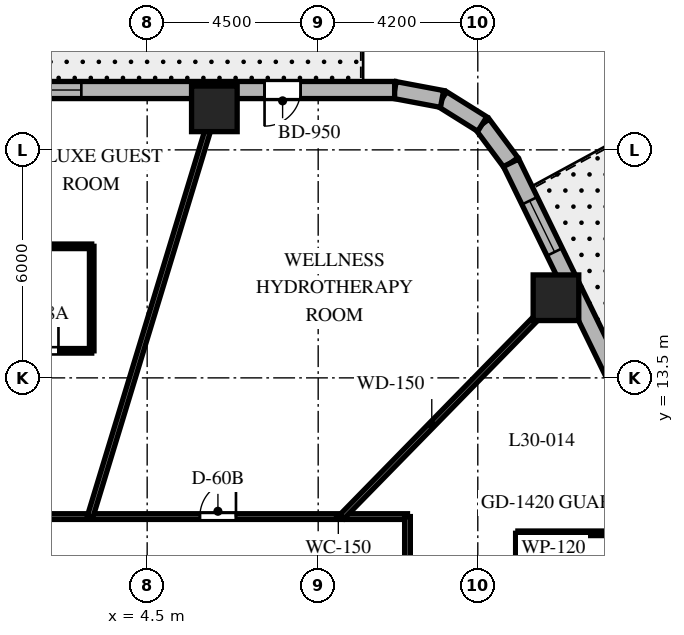
"""IFC4 building model, lengths in metres.
Left out: names, types, materials, properties, quantities, classifications, styles, units other than length and angle.
Written with IfcOpenShell. Run it as: python <this file> out.ifc"""

import sys

from ifc_helpers import new_model, si_unit, direction, frame, frame_2d, origin, origin_2d, place, context, subcontext, project, spatial, rectangle, extrude, element, fill, save


model = new_model("IFC4")
c1 = context("Model", 3, precision=1e-05, world=origin(), true_north=direction((0.0, 1.0)))
c2 = subcontext(c1, "Body", "Model", "MODEL_VIEW")
j1 = project(units=[si_unit("LENGTHUNIT", "METRE"), si_unit("PLANEANGLEUNIT", "RADIAN")], contexts=[c1])
p1 = place(None, origin())
s1 = spatial("IfcSite", under=j1, at=p1, CompositionType="ELEMENT")
p2 = place(p1, origin())
s2 = spatial("IfcBuilding", under=s1, at=p2, CompositionType="ELEMENT")
p3 = place(p2, frame((0.0, 0.0, 124.7)))
s3 = spatial("IfcBuildingStorey", under=s2, at=p3, CompositionType="ELEMENT", Elevation=124.7)
for number, where, z_axis, x_axis in (
    (1, (15.257, 15.609, 0.0), (0.0, 0.0, 1.0), (1.0, 0.0, 0.0)),
    (2, (6.268, 20.58, 0.0), (0.0, 0.0, 1.0), (1.0, 0.0, 0.0)),
):
    element("IfcColumn", number, at=place(p3, frame(where, z_axis=z_axis, x_axis=x_axis)), inside=s3, PredefinedType="COLUMN", context=c2, shape_type="SweptSolid", body=[
        extrude(rectangle(XDim=1.2, YDim=1.2, at=origin_2d()), origin(), (0.0, 0.0, 1.0), 3.7),
    ])
p4 = place(p3, frame((14.076, 19.161, 0.0), z_axis=(0.0, 0.0, 1.0), x_axis=(-0.597226657159, 0.802072515412, 0.0)))
e3 = element("IfcWall", 3, at=p4, inside=s3, PredefinedType="SOLIDWALL", context=c2, shape_type="SweptSolid", body=[
    extrude(rectangle(XDim=1.269, YDim=0.45, at=frame_2d((0.635, 0.0))), origin(), (0.0, 0.0, 1.0), 3.4),
])
p5 = place(p3, frame((13.318, 20.179, 0.0), z_axis=(0.0, 0.0, 1.0), x_axis=(-0.848031272749, 0.529946186362, 0.0)))
e4 = element("IfcWall", 4, at=p5, inside=s3, PredefinedType="SOLIDWALL", context=c2, shape_type="SweptSolid", body=[
    extrude(rectangle(XDim=1.248, YDim=0.45, at=frame_2d((0.624, 0.0))), origin(), (0.0, 0.0, 1.0), 3.4),
])
p6 = place(p3, frame((12.259, 20.84, 0.0), z_axis=(0.0, 0.0, 1.0), x_axis=(-0.982730354425, 0.185043374624, 0.0)))
e5 = element("IfcWall", 5, at=p6, inside=s3, PredefinedType="SOLIDWALL", context=c2, shape_type="SweptSolid", body=[
    extrude(rectangle(XDim=1.269, YDim=0.45, at=frame_2d((0.635, 0.0))), origin(), (0.0, 0.0, 1.0), 3.4),
])
p7 = place(p3, frame((22.238, 2.427, 0.0), z_axis=(0.0, 0.0, 1.0), x_axis=(-0.438374803278, 0.898792262901, 0.0)))
e6 = element("IfcWall", 6, at=p7, inside=s3, PredefinedType="SOLIDWALL", context=c2, shape_type="SweptSolid", body=[
    extrude(rectangle(XDim=18.618, YDim=0.45, at=frame_2d((9.309, 0.0))), origin(), (0.0, 0.0, 1.0), 3.4),
])
p8 = place(p7, frame((4.62, 0.0, 0.0)))
e7 = element("IfcOpeningElement", 7, at=p8, cuts=e6, PredefinedType="OPENING", context=c2, shape_type="SweptSolid", body=[
    extrude(rectangle(XDim=1.0, YDim=2.15, at=frame_2d((0.5, 1.075))), frame((0.0, 0.235, 0.0), z_axis=(0.0, -1.0, 0.0), x_axis=(1.0, 0.0, 0.0)), (0.0, 0.0, 1.0), 0.47),
])
p9 = place(p7, frame((8.61, 0.0, 0.8)))
e8 = element("IfcOpeningElement", 8, at=p9, cuts=e6, PredefinedType="OPENING", context=c2, shape_type="SweptSolid", body=[
    extrude(rectangle(XDim=1.5, YDim=1.8, at=frame_2d((0.75, 0.9))), frame((0.0, 0.235, 0.0), z_axis=(0.0, -1.0, 0.0), x_axis=(1.0, 0.0, 0.0)), (0.0, 0.0, 1.0), 0.47),
])
p10 = place(p7, frame((16.006, 0.0, 0.8)))
e9 = element("IfcOpeningElement", 9, at=p10, cuts=e6, PredefinedType="OPENING", context=c2, shape_type="SweptSolid", body=[
    extrude(rectangle(XDim=1.5, YDim=1.8, at=frame_2d((0.75, 0.9))), frame((0.0, 0.235, 0.0), z_axis=(0.0, -1.0, 0.0), x_axis=(1.0, 0.0, 0.0)), (0.0, 0.0, 1.0), 0.47),
])
p11 = place(p7, frame((1.163, 0.0, 0.8)))
e10 = element("IfcOpeningElement", 10, at=p11, cuts=e6, PredefinedType="OPENING", context=c2, shape_type="SweptSolid", body=[
    extrude(rectangle(XDim=1.5, YDim=1.8, at=frame_2d((0.75, 0.9))), frame((0.0, 0.235, 0.0), z_axis=(0.0, -1.0, 0.0), x_axis=(1.0, 0.0, 0.0)), (0.0, 0.0, 1.0), 0.47),
])
p12 = place(p3, frame((11.012, 21.075, 0.0), z_axis=(0.0, 0.0, 1.0), x_axis=(-1.0, 0.0, 0.0)))
e11 = element("IfcWall", 11, at=p12, inside=s3, PredefinedType="SOLIDWALL", context=c2, shape_type="SweptSolid", body=[
    extrude(rectangle(XDim=23.782, YDim=0.45, at=frame_2d((11.891, 0.0))), origin(), (0.0, 0.0, 1.0), 3.4),
])
p13 = place(p12, frame((2.473, 0.0, 0.0)))
e12 = element("IfcOpeningElement", 12, at=p13, cuts=e11, PredefinedType="OPENING", context=c2, shape_type="SweptSolid", body=[
    extrude(rectangle(XDim=0.95, YDim=2.15, at=frame_2d((0.475, 1.075))), frame((0.0, 0.235, 0.0), z_axis=(0.0, -1.0, 0.0), x_axis=(1.0, 0.0, 0.0)), (0.0, 0.0, 1.0), 0.47),
])
p14 = place(p12, frame((8.244, 0.0, 0.8)))
e13 = element("IfcOpeningElement", 13, at=p14, cuts=e11, PredefinedType="OPENING", context=c2, shape_type="SweptSolid", body=[
    extrude(rectangle(XDim=1.5, YDim=1.8, at=frame_2d((0.75, 0.9))), frame((0.0, 0.235, 0.0), z_axis=(0.0, -1.0, 0.0), x_axis=(1.0, 0.0, 0.0)), (0.0, 0.0, 1.0), 0.47),
])
p15 = place(p12, frame((14.811, 0.0, 0.8)))
e14 = element("IfcOpeningElement", 14, at=p15, cuts=e11, PredefinedType="OPENING", context=c2, shape_type="SweptSolid", body=[
    extrude(rectangle(XDim=1.5, YDim=1.8, at=frame_2d((0.75, 0.9))), frame((0.0, 0.235, 0.0), z_axis=(0.0, -1.0, 0.0), x_axis=(1.0, 0.0, 0.0)), (0.0, 0.0, 1.0), 0.47),
])
p16 = place(p12, frame((20.741, 0.0, 0.8)))
e15 = element("IfcOpeningElement", 15, at=p16, cuts=e11, PredefinedType="OPENING", context=c2, shape_type="SweptSolid", body=[
    extrude(rectangle(XDim=1.5, YDim=1.8, at=frame_2d((0.75, 0.9))), frame((0.0, 0.235, 0.0), z_axis=(0.0, -1.0, 0.0), x_axis=(1.0, 0.0, 0.0)), (0.0, 0.0, 1.0), 0.47),
])
p17 = place(p3, frame((-11.35, 9.85, 0.0), z_axis=(0.0, 0.0, 1.0), x_axis=(1.0, 0.0, 0.0)))
e16 = element("IfcWall", 16, at=p17, inside=s3, PredefinedType="PARTITIONING", context=c2, shape_type="SweptSolid", body=[
    extrude(rectangle(XDim=22.7, YDim=0.15, at=frame_2d((11.35, 0.0))), origin(), (0.0, 0.0, 1.0), 2.84),
])
p18 = place(p17, frame((17.237, 0.0, 0.0)))
e17 = element("IfcOpeningElement", 17, at=p18, cuts=e16, PredefinedType="OPENING", context=c2, shape_type="SweptSolid", body=[
    extrude(rectangle(XDim=0.95, YDim=2.03, at=frame_2d((0.475, 1.015))), frame((0.0, 0.085, 0.0), z_axis=(0.0, -1.0, 0.0), x_axis=(1.0, 0.0, 0.0)), (0.0, 0.0, 1.0), 0.17),
])
p19 = place(p17, frame((11.994, 0.0, 0.0)))
e18 = element("IfcOpeningElement", 18, at=p19, cuts=e16, PredefinedType="OPENING", context=c2, shape_type="SweptSolid", body=[
    extrude(rectangle(XDim=0.95, YDim=2.03, at=frame_2d((0.475, 1.015))), frame((0.0, 0.085, 0.0), z_axis=(0.0, -1.0, 0.0), x_axis=(1.0, 0.0, 0.0)), (0.0, 0.0, 1.0), 0.17),
])
p20 = place(p17, frame((8.559, 0.0, 0.0)))
e19 = element("IfcOpeningElement", 19, at=p20, cuts=e16, PredefinedType="OPENING", context=c2, shape_type="SweptSolid", body=[
    extrude(rectangle(XDim=0.95, YDim=2.03, at=frame_2d((0.475, 1.015))), frame((0.0, 0.085, 0.0), z_axis=(0.0, -1.0, 0.0), x_axis=(1.0, 0.0, 0.0)), (0.0, 0.0, 1.0), 0.17),
])
p21 = place(p17, frame((3.399, 0.0, 0.0)))
e20 = element("IfcOpeningElement", 20, at=p21, cuts=e16, PredefinedType="OPENING", context=c2, shape_type="SweptSolid", body=[
    extrude(rectangle(XDim=0.95, YDim=2.03, at=frame_2d((0.475, 1.015))), frame((0.0, 0.085, 0.0), z_axis=(0.0, -1.0, 0.0), x_axis=(1.0, 0.0, 0.0)), (0.0, 0.0, 1.0), 0.17),
])
p22 = place(p3, frame((11.35, 9.85, 0.0), z_axis=(0.0, 0.0, 1.0), x_axis=(0.0, -1.0, 0.0)))
e21 = element("IfcWall", 21, at=p22, inside=s3, PredefinedType="PARTITIONING", context=c2, shape_type="SweptSolid", body=[
    extrude(rectangle(XDim=19.7, YDim=0.15, at=frame_2d((9.85, 0.0))), origin(), (0.0, 0.0, 1.0), 2.84),
])
p23 = place(p22, frame((3.008, 0.0, 0.0)))
e22 = element("IfcOpeningElement", 22, at=p23, cuts=e21, PredefinedType="OPENING", context=c2, shape_type="SweptSolid", body=[
    extrude(rectangle(XDim=0.95, YDim=2.03, at=frame_2d((0.475, 1.015))), frame((0.0, 0.085, 0.0), z_axis=(0.0, -1.0, 0.0), x_axis=(1.0, 0.0, 0.0)), (0.0, 0.0, 1.0), 0.17),
])
p24 = place(p22, frame((15.205, 0.0, 0.0)))
e23 = element("IfcOpeningElement", 23, at=p24, cuts=e21, PredefinedType="OPENING", context=c2, shape_type="SweptSolid", body=[
    extrude(rectangle(XDim=0.95, YDim=2.03, at=frame_2d((0.475, 1.015))), frame((0.0, 0.085, 0.0), z_axis=(0.0, -1.0, 0.0), x_axis=(1.0, 0.0, 0.0)), (0.0, 0.0, 1.0), 0.17),
])
p25 = place(p22, frame((8.836, 0.0, 0.0)))
e24 = element("IfcOpeningElement", 24, at=p25, cuts=e21, PredefinedType="OPENING", context=c2, shape_type="SweptSolid", body=[
    extrude(rectangle(XDim=0.95, YDim=2.03, at=frame_2d((0.475, 1.015))), frame((0.0, 0.085, 0.0), z_axis=(0.0, -1.0, 0.0), x_axis=(1.0, 0.0, 0.0)), (0.0, 0.0, 1.0), 0.17),
])
p26 = place(p3, frame((9.628, 9.85, 0.0), z_axis=(0.0, 0.0, 1.0), x_axis=(0.698992824326, 0.715128681805, 0.0)))
e25 = element("IfcWall", 25, at=p26, inside=s3, PredefinedType="PARTITIONING", context=c2, shape_type="SweptSolid", body=[
    extrude(rectangle(XDim=8.579, YDim=0.15, at=frame_2d((4.29, 0.0))), origin(), (0.0, 0.0, 1.0), 2.54),
])
p27 = place(p3, frame((3.0, 9.85, 0.0), z_axis=(0.0, 0.0, 1.0), x_axis=(0.291352035382, 0.95661590593, 0.0)))
e26 = element("IfcWall", 26, at=p27, inside=s3, PredefinedType="PARTITIONING", context=c2, shape_type="SweptSolid", body=[
    extrude(rectangle(XDim=11.734, YDim=0.15, at=frame_2d((5.867, 0.0))), origin(), (0.0, 0.0, 1.0), 2.54),
])
p28 = place(p3, frame((16.695, 9.41, 0.0), z_axis=(0.0, 0.0, 1.0), x_axis=(-1.0, 0.0, 0.0)))
e27 = element("IfcWall", 27, at=p28, inside=s3, PredefinedType="PARTITIONING", context=c2, shape_type="SweptSolid", body=[
    extrude(rectangle(XDim=2.44, YDim=0.12, at=frame_2d((1.22, 0.0))), origin(), (0.0, 0.0, 1.0), 2.927),
])
p29 = place(p3, frame((14.255, 9.41, 0.0), z_axis=(0.0, 0.0, 1.0), x_axis=(0.0, -1.0, 0.0)))
e28 = element("IfcWall", 28, at=p29, inside=s3, PredefinedType="PARTITIONING", context=c2, shape_type="SweptSolid", body=[
    extrude(rectangle(XDim=2.61, YDim=0.12, at=frame_2d((1.305, 0.0))), origin(), (0.0, 0.0, 1.0), 3.4),
])
p30 = place(p3, frame((0.441, 14.212, 0.0), z_axis=(0.0, 0.0, 1.0), x_axis=(1.0, 0.0, 0.0)))
e29 = element("IfcWall", 29, at=p30, inside=s3, PredefinedType="PARTITIONING", context=c2, shape_type="SweptSolid", body=[
    extrude(rectangle(XDim=2.6, YDim=0.12, at=frame_2d((1.3, 0.0))), origin(), (0.0, 0.0, 1.0), 3.4),
])
p31 = place(p30, frame((0.875, 0.0, 0.0)))
e30 = element("IfcOpeningElement", 30, at=p31, cuts=e29, PredefinedType="OPENING", context=c2, shape_type="SweptSolid", body=[
    extrude(rectangle(XDim=0.85, YDim=2.03, at=frame_2d((0.425, 1.015))), frame((0.0, 0.07, 0.0), z_axis=(0.0, -1.0, 0.0), x_axis=(1.0, 0.0, 0.0)), (0.0, 0.0, 1.0), 0.14),
])
p32 = place(p3, frame((3.041, 14.212, 0.0), z_axis=(0.0, 0.0, 1.0), x_axis=(0.0, 1.0, 0.0)))
e31 = element("IfcWall", 31, at=p32, inside=s3, PredefinedType="PARTITIONING", context=c2, shape_type="SweptSolid", body=[
    extrude(rectangle(XDim=2.75, YDim=0.12, at=frame_2d((1.375, 0.0))), origin(), (0.0, 0.0, 1.0), 2.84),
])
p33 = place(p3, frame((3.041, 16.962, 0.0), z_axis=(0.0, 0.0, 1.0), x_axis=(-1.0, 0.0, 0.0)))
e32 = element("IfcWall", 32, at=p33, inside=s3, PredefinedType="PARTITIONING", context=c2, shape_type="SweptSolid", body=[
    extrude(rectangle(XDim=2.6, YDim=0.12, at=frame_2d((1.3, 0.0))), origin(), (0.0, 0.0, 1.0), 3.4),
])
p34 = place(p10, origin())
e33 = element("IfcWindow", 33, at=p34, inside=s3, PartitioningType="SINGLE_PANEL", PredefinedType="WINDOW", context=c2, shape_type="SweptSolid", body=[
    extrude(rectangle(XDim=1.5, YDim=1.8, at=frame_2d((0.75, 0.9))), frame((0.0, 0.03, 0.0), z_axis=(0.0, -1.0, 0.0), x_axis=(1.0, 0.0, 0.0)), (0.0, 0.0, 1.0), 0.06),
])
fill(e9, e33)
p35 = place(p13, origin())
e34 = element("IfcDoor", 34, at=p35, inside=s3, OperationType="SINGLE_SWING_RIGHT", PredefinedType="DOOR", context=c2, shape_type="SweptSolid", body=[
    extrude(rectangle(XDim=0.95, YDim=2.15, at=frame_2d((0.475, 1.075))), frame((0.0, 0.025, 0.0), z_axis=(0.0, -1.0, 0.0), x_axis=(1.0, 0.0, 0.0)), (0.0, 0.0, 1.0), 0.05),
])
fill(e12, e34)
p36 = place(p14, origin())
e35 = element("IfcWindow", 35, at=p36, inside=s3, PartitioningType="SINGLE_PANEL", PredefinedType="WINDOW", context=c2, shape_type="SweptSolid", body=[
    extrude(rectangle(XDim=1.5, YDim=1.8, at=frame_2d((0.75, 0.9))), frame((0.0, 0.03, 0.0), z_axis=(0.0, -1.0, 0.0), x_axis=(1.0, 0.0, 0.0)), (0.0, 0.0, 1.0), 0.06),
])
fill(e13, e35)
p37 = place(p18, origin())
e36 = element("IfcDoor", 36, at=p37, inside=s3, OperationType="SINGLE_SWING_RIGHT", PredefinedType="DOOR", context=c2, shape_type="SweptSolid", body=[
    extrude(rectangle(XDim=0.95, YDim=2.03, at=frame_2d((0.475, 1.015))), frame((0.0, 0.025, 0.0), z_axis=(0.0, -1.0, 0.0), x_axis=(1.0, 0.0, 0.0)), (0.0, 0.0, 1.0), 0.05),
])
fill(e17, e36)
p38 = place(p31, origin())
e37 = element("IfcDoor", 37, at=p38, inside=s3, OperationType="SINGLE_SWING_RIGHT", PredefinedType="DOOR", context=c2, shape_type="SweptSolid", body=[
    extrude(rectangle(XDim=0.85, YDim=2.03, at=frame_2d((0.425, 1.015))), frame((0.0, 0.025, 0.0), z_axis=(0.0, -1.0, 0.0), x_axis=(1.0, 0.0, 0.0)), (0.0, 0.0, 1.0), 0.05),
])
fill(e30, e37)
save(model, sys.argv[1])
